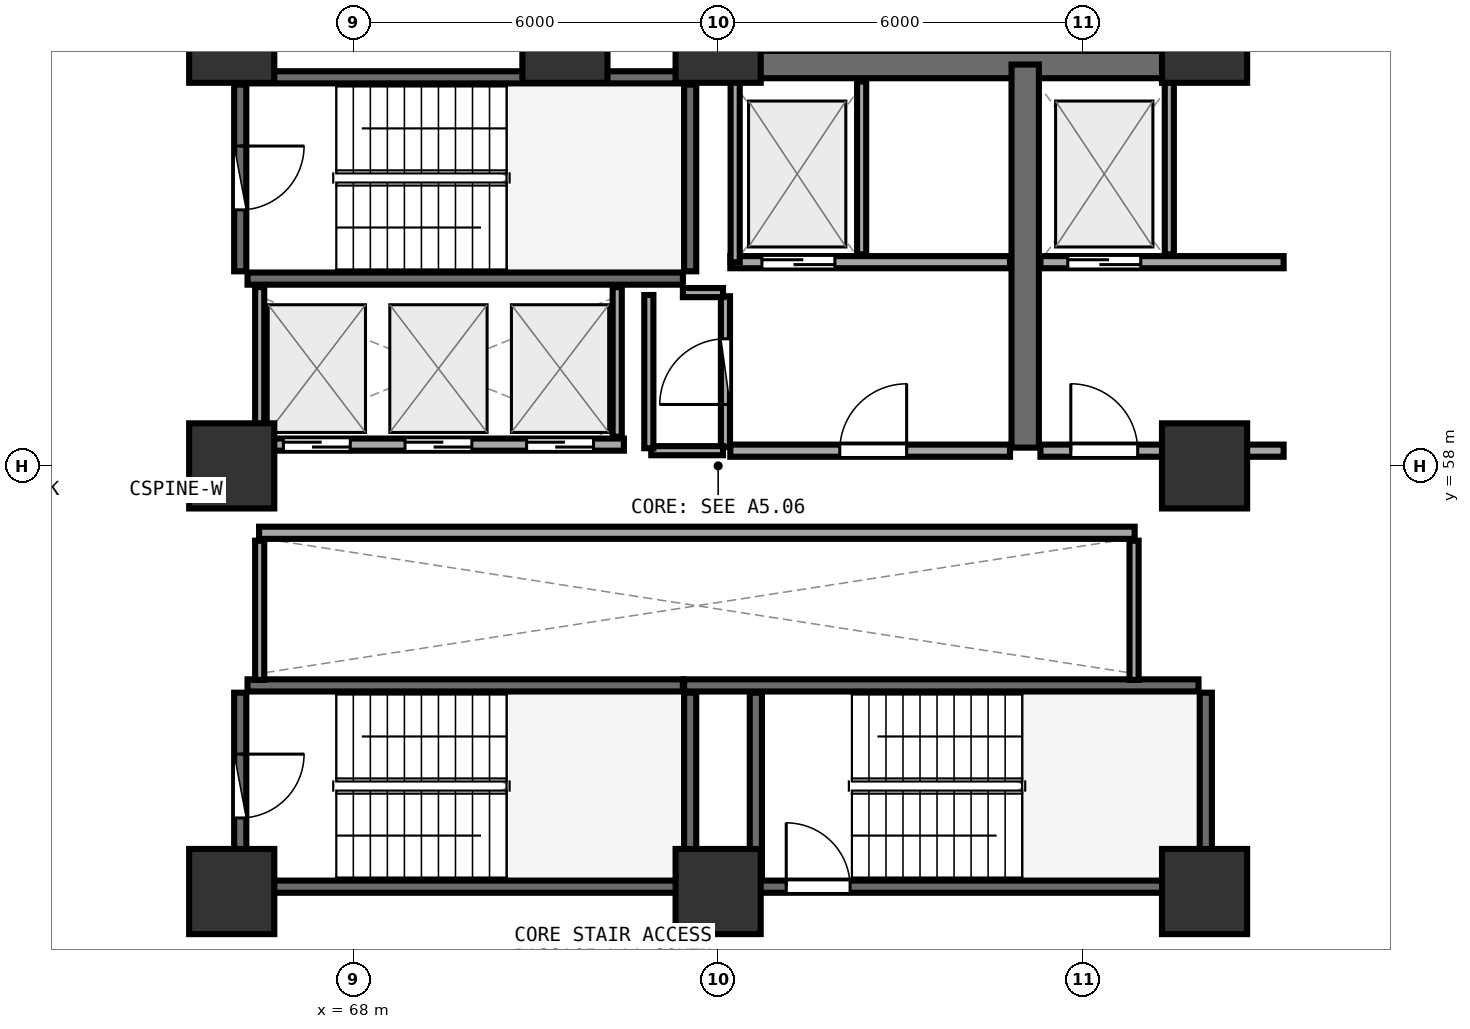
"""IFC4 building model, lengths in metres.
Left out: names, types, materials, properties, quantities, classifications, styles, units other than length and angle.
Written with IfcOpenShell. Run it as: python <this file> out.ifc"""

import sys

from ifc_helpers import new_model, si_unit, direction, frame, frame_2d, origin, origin_2d, place, context, subcontext, project, spatial, rectangle, extrude, element, fill, save


model = new_model("IFC4")
c1 = context("Model", 3, precision=1e-05, world=origin(), true_north=direction((0.0, 1.0)))
c2 = subcontext(c1, "Body", "Model", "MODEL_VIEW")
j1 = project(units=[si_unit("LENGTHUNIT", "METRE"), si_unit("PLANEANGLEUNIT", "RADIAN")], contexts=[c1])
p1 = place(None, origin())
s1 = spatial("IfcSite", under=j1, at=p1, CompositionType="ELEMENT")
p2 = place(p1, origin())
s2 = spatial("IfcBuilding", under=s1, at=p2, CompositionType="ELEMENT")
p3 = place(p2, frame((0.0, 0.0, 45.0)))
s3 = spatial("IfcBuildingStorey", under=s2, at=p3, CompositionType="ELEMENT", Elevation=45.0)
for number, where, z_axis, x_axis in (
    (1, (66.0, 51.0, 0.0), (0.0, 0.0, 1.0), (1.0, 0.0, 0.0)),
    (2, (74.0, 51.0, 0.0), (0.0, 0.0, 1.0), (1.0, 0.0, 0.0)),
    (3, (82.0, 51.0, 0.0), (0.0, 0.0, 1.0), (1.0, 0.0, 0.0)),
    (4, (82.0, 58.0, 0.0), (0.0, 0.0, 1.0), (1.0, 0.0, 0.0)),
    (5, (82.0, 65.0, 0.0), (0.0, 0.0, 1.0), (1.0, 0.0, 0.0)),
    (6, (74.0, 65.0, 0.0), (0.0, 0.0, 1.0), (1.0, 0.0, 0.0)),
    (7, (71.48, 65.0, 0.0), (0.0, 0.0, 1.0), (1.0, 0.0, 0.0)),
    (8, (66.0, 65.0, 0.0), (0.0, 0.0, 1.0), (1.0, 0.0, 0.0)),
    (9, (66.0, 58.0, 0.0), (0.0, 0.0, 1.0), (1.0, 0.0, 0.0)),
):
    element("IfcColumn", number, at=place(p3, frame(where, z_axis=z_axis, x_axis=x_axis)), inside=s3, PredefinedType="PILASTER", context=c2, shape_type="SweptSolid", body=[
        extrude(rectangle(XDim=1.4, YDim=1.4, at=origin_2d()), origin(), (0.0, 0.0, 1.0), 3.75),
    ])
p4 = place(p3, frame((66.26, 61.08, 0.0), z_axis=(0.0, 0.0, 1.0), x_axis=(1.0, 0.0, 0.0)))
e10 = element("IfcWall", 10, at=p4, inside=s3, PredefinedType="SHEAR", context=c2, shape_type="SweptSolid", body=[
    extrude(rectangle(XDim=7.16, YDim=0.2, at=frame_2d((3.58, 0.0))), origin(), (0.0, 0.0, 1.0), 3.49),
])
p5 = place(p3, frame((73.54, 61.2, 0.0), z_axis=(0.0, 0.0, 1.0), x_axis=(0.0, 1.0, 0.0)))
e11 = element("IfcWall", 11, at=p5, inside=s3, PredefinedType="SHEAR", context=c2, shape_type="SweptSolid", body=[
    extrude(rectangle(XDim=3.07, YDim=0.2, at=frame_2d((1.535, 0.0))), origin(), (0.0, 0.0, 1.0), 3.49),
])
p6 = place(p3, frame((73.42, 64.39, 0.0), z_axis=(0.0, 0.0, 1.0), x_axis=(-1.0, 0.0, 0.0)))
e12 = element("IfcWall", 12, at=p6, inside=s3, PredefinedType="SHEAR", context=c2, shape_type="SweptSolid", body=[
    extrude(rectangle(XDim=7.16, YDim=0.2, at=frame_2d((3.58, 0.0))), origin(), (0.0, 0.0, 1.0), 3.49),
])
p7 = place(p3, frame((66.14, 64.27, 0.0), z_axis=(0.0, 0.0, 1.0), x_axis=(0.0, -1.0, 0.0)))
e13 = element("IfcWall", 13, at=p7, inside=s3, PredefinedType="SHEAR", context=c2, shape_type="SweptSolid", body=[
    extrude(rectangle(XDim=3.07, YDim=0.2, at=frame_2d((1.535, 0.0))), origin(), (0.0, 0.0, 1.0), 3.49),
])
p8 = place(p7, frame((1.01, 0.0, 0.0)))
e14 = element("IfcOpeningElement", 14, at=p8, cuts=e13, PredefinedType="OPENING", context=c2, shape_type="SweptSolid", body=[
    extrude(rectangle(XDim=1.05, YDim=2.1, at=frame_2d((0.525, 1.05))), frame((0.0, 0.11, 0.0), z_axis=(0.0, -1.0, 0.0), x_axis=(1.0, 0.0, 0.0)), (0.0, 0.0, 1.0), 0.22),
])
p9 = place(p3, frame((74.0, 51.08, 0.0), z_axis=(0.0, 0.0, 1.0), x_axis=(1.0, 0.0, 0.0)))
e15 = element("IfcWall", 15, at=p9, inside=s3, PredefinedType="SHEAR", context=c2, shape_type="SweptSolid", body=[
    extrude(rectangle(XDim=7.9, YDim=0.2, at=frame_2d((3.95, 0.0))), origin(), (0.0, 0.0, 1.0), 3.49),
])
p10 = place(p9, frame((1.12, 0.0, 0.0)))
e16 = element("IfcOpeningElement", 16, at=p10, cuts=e15, PredefinedType="OPENING", context=c2, shape_type="SweptSolid", body=[
    extrude(rectangle(XDim=1.05, YDim=2.1, at=frame_2d((0.525, 1.05))), frame((0.0, 0.11, 0.0), z_axis=(0.0, -1.0, 0.0), x_axis=(1.0, 0.0, 0.0)), (0.0, 0.0, 1.0), 0.22),
])
p11 = place(p3, frame((82.02, 51.2, 0.0), z_axis=(0.0, 0.0, 1.0), x_axis=(0.0, 1.0, 0.0)))
e17 = element("IfcWall", 17, at=p11, inside=s3, PredefinedType="SHEAR", context=c2, shape_type="SweptSolid", body=[
    extrude(rectangle(XDim=3.07, YDim=0.2, at=frame_2d((1.535, 0.0))), origin(), (0.0, 0.0, 1.0), 3.49),
])
p12 = place(p3, frame((81.9, 54.39, 0.0), z_axis=(0.0, 0.0, 1.0), x_axis=(-1.0, 0.0, 0.0)))
e18 = element("IfcWall", 18, at=p12, inside=s3, PredefinedType="SHEAR", context=c2, shape_type="SweptSolid", body=[
    extrude(rectangle(XDim=8.46, YDim=0.2, at=frame_2d((4.23, 0.0))), origin(), (0.0, 0.0, 1.0), 3.49),
])
p13 = place(p3, frame((74.62, 54.27, 0.0), z_axis=(0.0, 0.0, 1.0), x_axis=(0.0, -1.0, 0.0)))
e19 = element("IfcWall", 19, at=p13, inside=s3, PredefinedType="SHEAR", context=c2, shape_type="SweptSolid", body=[
    extrude(rectangle(XDim=3.07, YDim=0.2, at=frame_2d((1.535, 0.0))), origin(), (0.0, 0.0, 1.0), 3.49),
])
p14 = place(p3, frame((66.26, 51.08, 0.0), z_axis=(0.0, 0.0, 1.0), x_axis=(1.0, 0.0, 0.0)))
e20 = element("IfcWall", 20, at=p14, inside=s3, PredefinedType="SHEAR", context=c2, shape_type="SweptSolid", body=[
    extrude(rectangle(XDim=7.16, YDim=0.2, at=frame_2d((3.58, 0.0))), origin(), (0.0, 0.0, 1.0), 3.49),
])
p15 = place(p3, frame((73.54, 51.2, 0.0), z_axis=(0.0, 0.0, 1.0), x_axis=(0.0, 1.0, 0.0)))
e21 = element("IfcWall", 21, at=p15, inside=s3, PredefinedType="SHEAR", context=c2, shape_type="SweptSolid", body=[
    extrude(rectangle(XDim=3.07, YDim=0.2, at=frame_2d((1.535, 0.0))), origin(), (0.0, 0.0, 1.0), 3.49),
])
p16 = place(p3, frame((73.42, 54.39, 0.0), z_axis=(0.0, 0.0, 1.0), x_axis=(-1.0, 0.0, 0.0)))
e22 = element("IfcWall", 22, at=p16, inside=s3, PredefinedType="SHEAR", context=c2, shape_type="SweptSolid", body=[
    extrude(rectangle(XDim=7.16, YDim=0.2, at=frame_2d((3.58, 0.0))), origin(), (0.0, 0.0, 1.0), 3.49),
])
p17 = place(p3, frame((66.14, 54.27, 0.0), z_axis=(0.0, 0.0, 1.0), x_axis=(0.0, -1.0, 0.0)))
e23 = element("IfcWall", 23, at=p17, inside=s3, PredefinedType="SHEAR", context=c2, shape_type="SweptSolid", body=[
    extrude(rectangle(XDim=3.07, YDim=0.2, at=frame_2d((1.535, 0.0))), origin(), (0.0, 0.0, 1.0), 3.49),
])
p18 = place(p17, frame((1.01, 0.0, 0.0)))
e24 = element("IfcOpeningElement", 24, at=p18, cuts=e23, PredefinedType="OPENING", context=c2, shape_type="SweptSolid", body=[
    extrude(rectangle(XDim=1.05, YDim=2.1, at=frame_2d((0.525, 1.05))), frame((0.0, 0.11, 0.0), z_axis=(0.0, -1.0, 0.0), x_axis=(1.0, 0.0, 0.0)), (0.0, 0.0, 1.0), 0.22),
])
p19 = place(p3, frame((74.0, 64.6, 0.0), z_axis=(0.0, 0.0, 1.0), x_axis=(1.0, 0.0, 0.0)))
e25 = element("IfcWall", 25, at=p19, inside=s3, PredefinedType="SHEAR", context=c2, shape_type="SweptSolid", body=[
    extrude(rectangle(XDim=8.0, YDim=0.45, at=frame_2d((4.0, 0.0))), origin(), (0.0, 0.0, 1.0), 3.49),
])
p20 = place(p3, frame((79.05, 58.3, 0.0), z_axis=(0.0, 0.0, 1.0), x_axis=(0.0, 1.0, 0.0)))
e26 = element("IfcWall", 26, at=p20, inside=s3, PredefinedType="SHEAR", context=c2, shape_type="SweptSolid", body=[
    extrude(rectangle(XDim=6.3, YDim=0.45, at=frame_2d((3.15, 0.0))), origin(), (0.0, 0.0, 1.0), 3.49),
])
p21 = place(p3, frame((74.2, 61.35, 0.0), z_axis=(0.0, 0.0, 1.0), x_axis=(1.0, 0.0, 0.0)))
e27 = element("IfcWall", 27, at=p21, inside=s3, PredefinedType="SOLIDWALL", context=c2, shape_type="SweptSolid", body=[
    extrude(rectangle(XDim=4.6, YDim=0.2, at=frame_2d((2.3, 0.0))), origin(), (0.0, 0.0, 1.0), 3.48),
])
p22 = place(p21, frame((0.52, 0.0, 0.0)))
e28 = element("IfcOpeningElement", 28, at=p22, cuts=e27, PredefinedType="OPENING", context=c2, shape_type="SweptSolid", body=[
    extrude(rectangle(XDim=1.2, YDim=2.15, at=frame_2d((0.6, 1.075))), frame((0.0, 0.11, 0.0), z_axis=(0.0, -1.0, 0.0), x_axis=(1.0, 0.0, 0.0)), (0.0, 0.0, 1.0), 0.22),
])
p23 = place(p3, frame((74.28, 61.35, 0.0), z_axis=(0.0, 0.0, 1.0), x_axis=(0.0, 1.0, 0.0)))
e29 = element("IfcWall", 29, at=p23, inside=s3, PredefinedType="PARTITIONING", context=c2, shape_type="SweptSolid", body=[
    extrude(rectangle(XDim=2.97, YDim=0.15, at=frame_2d((1.485, 0.0))), origin(), (0.0, 0.0, 1.0), 3.48),
])
p24 = place(p3, frame((76.36, 61.48, 0.0), z_axis=(0.0, 0.0, 1.0), x_axis=(0.0, 1.0, 0.0)))
e30 = element("IfcWall", 30, at=p24, inside=s3, PredefinedType="PARTITIONING", context=c2, shape_type="SweptSolid", body=[
    extrude(rectangle(XDim=2.84, YDim=0.15, at=frame_2d((1.42, 0.0))), origin(), (0.0, 0.0, 1.0), 3.48),
])
p25 = place(p3, frame((79.3, 61.35, 0.0), z_axis=(0.0, 0.0, 1.0), x_axis=(1.0, 0.0, 0.0)))
e31 = element("IfcWall", 31, at=p25, inside=s3, PredefinedType="SOLIDWALL", context=c2, shape_type="SweptSolid", body=[
    extrude(rectangle(XDim=4.0, YDim=0.2, at=frame_2d((2.0, 0.0))), origin(), (0.0, 0.0, 1.0), 2.775),
])
p26 = place(p25, frame((0.45, 0.0, 0.0)))
e32 = element("IfcOpeningElement", 32, at=p26, cuts=e31, PredefinedType="OPENING", context=c2, shape_type="SweptSolid", body=[
    extrude(rectangle(XDim=1.2, YDim=2.15, at=frame_2d((0.6, 1.075))), frame((0.0, 0.11, 0.0), z_axis=(0.0, -1.0, 0.0), x_axis=(1.0, 0.0, 0.0)), (0.0, 0.0, 1.0), 0.22),
])
p27 = place(p3, frame((81.42, 61.48, 0.0), z_axis=(0.0, 0.0, 1.0), x_axis=(0.0, 1.0, 0.0)))
e33 = element("IfcWall", 33, at=p27, inside=s3, PredefinedType="PARTITIONING", context=c2, shape_type="SweptSolid", body=[
    extrude(rectangle(XDim=2.84, YDim=0.15, at=frame_2d((1.42, 0.0))), origin(), (0.0, 0.0, 1.0), 3.48),
])
p28 = place(p3, frame((74.2, 58.25, 0.0), z_axis=(0.0, 0.0, 1.0), x_axis=(1.0, 0.0, 0.0)))
e34 = element("IfcWall", 34, at=p28, inside=s3, PredefinedType="SOLIDWALL", context=c2, shape_type="SweptSolid", body=[
    extrude(rectangle(XDim=4.6, YDim=0.2, at=frame_2d((2.3, 0.0))), origin(), (0.0, 0.0, 1.0), 3.48),
])
p29 = place(p28, frame((1.8, 0.0, 0.0)))
e35 = element("IfcOpeningElement", 35, at=p29, cuts=e34, PredefinedType="OPENING", context=c2, shape_type="SweptSolid", body=[
    extrude(rectangle(XDim=1.1, YDim=2.1, at=frame_2d((0.55, 1.05))), frame((0.0, 0.11, 0.0), z_axis=(0.0, -1.0, 0.0), x_axis=(1.0, 0.0, 0.0)), (0.0, 0.0, 1.0), 0.22),
])
p30 = place(p3, frame((79.3, 58.25, 0.0), z_axis=(0.0, 0.0, 1.0), x_axis=(1.0, 0.0, 0.0)))
e36 = element("IfcWall", 36, at=p30, inside=s3, PredefinedType="SOLIDWALL", context=c2, shape_type="SweptSolid", body=[
    extrude(rectangle(XDim=4.0, YDim=0.2, at=frame_2d((2.0, 0.0))), origin(), (0.0, 0.0, 1.0), 2.775),
])
p31 = place(p30, frame((0.5, 0.0, 0.0)))
e37 = element("IfcOpeningElement", 37, at=p31, cuts=e36, PredefinedType="OPENING", context=c2, shape_type="SweptSolid", body=[
    extrude(rectangle(XDim=1.1, YDim=2.1, at=frame_2d((0.55, 1.05))), frame((0.0, 0.11, 0.0), z_axis=(0.0, -1.0, 0.0), x_axis=(1.0, 0.0, 0.0)), (0.0, 0.0, 1.0), 0.22),
])
p32 = place(p3, frame((66.45, 58.35, 0.0), z_axis=(0.0, 0.0, 1.0), x_axis=(1.0, 0.0, 0.0)))
e38 = element("IfcWall", 38, at=p32, inside=s3, PredefinedType="SOLIDWALL", context=c2, shape_type="SweptSolid", body=[
    extrude(rectangle(XDim=6.0, YDim=0.2, at=frame_2d((3.0, 0.0))), origin(), (0.0, 0.0, 1.0), 3.48),
])
p33 = place(p32, frame((0.4, 0.0, 0.0)))
e39 = element("IfcOpeningElement", 39, at=p33, cuts=e38, PredefinedType="OPENING", context=c2, shape_type="SweptSolid", body=[
    extrude(rectangle(XDim=1.1, YDim=2.1, at=frame_2d((0.55, 1.05))), frame((0.0, 0.11, 0.0), z_axis=(0.0, -1.0, 0.0), x_axis=(1.0, 0.0, 0.0)), (0.0, 0.0, 1.0), 0.22),
])
p34 = place(p32, frame((2.4, 0.0, 0.0)))
e40 = element("IfcOpeningElement", 40, at=p34, cuts=e38, PredefinedType="OPENING", context=c2, shape_type="SweptSolid", body=[
    extrude(rectangle(XDim=1.1, YDim=2.1, at=frame_2d((0.55, 1.05))), frame((0.0, 0.11, 0.0), z_axis=(0.0, -1.0, 0.0), x_axis=(1.0, 0.0, 0.0)), (0.0, 0.0, 1.0), 0.22),
])
p35 = place(p32, frame((4.4, 0.0, 0.0)))
e41 = element("IfcOpeningElement", 41, at=p35, cuts=e38, PredefinedType="OPENING", context=c2, shape_type="SweptSolid", body=[
    extrude(rectangle(XDim=1.1, YDim=2.1, at=frame_2d((0.55, 1.05))), frame((0.0, 0.11, 0.0), z_axis=(0.0, -1.0, 0.0), x_axis=(1.0, 0.0, 0.0)), (0.0, 0.0, 1.0), 0.22),
])
for number, where, z_axis, x_axis in (
    (42, (66.46, 58.48, 0.0), (0.0, 0.0, 1.0), (0.0, 1.0, 0.0)),
    (43, (72.34, 58.48, 0.0), (0.0, 0.0, 1.0), (0.0, 1.0, 0.0)),
):
    element("IfcWall", number, at=place(p3, frame(where, z_axis=z_axis, x_axis=x_axis)), inside=s3, PredefinedType="PARTITIONING", context=c2, shape_type="SweptSolid", body=[
        extrude(rectangle(XDim=2.46, YDim=0.15, at=frame_2d((1.23, 0.0))), origin(), (0.0, 0.0, 1.0), 3.48),
    ])
p36 = place(p3, frame((66.45, 56.9, 0.0), z_axis=(0.0, 0.0, 1.0), x_axis=(1.0, 0.0, 0.0)))
e44 = element("IfcWall", 44, at=p36, inside=s3, PredefinedType="SOLIDWALL", context=c2, shape_type="SweptSolid", body=[
    extrude(rectangle(XDim=14.4, YDim=0.2, at=frame_2d((7.2, 0.0))), origin(), (0.0, 0.0, 1.0), 3.48),
])
for number, where, z_axis, x_axis in (
    (45, (66.46, 54.48, 0.0), (0.0, 0.0, 1.0), (0.0, 1.0, 0.0)),
    (46, (80.84, 54.48, 0.0), (0.0, 0.0, 1.0), (0.0, 1.0, 0.0)),
):
    element("IfcWall", number, at=place(p3, frame(where, z_axis=z_axis, x_axis=x_axis)), inside=s3, PredefinedType="PARTITIONING", context=c2, shape_type="SweptSolid", body=[
        extrude(rectangle(XDim=2.29, YDim=0.15, at=frame_2d((1.145, 0.0))), origin(), (0.0, 0.0, 1.0), 3.48),
    ])
p37 = place(p3, frame((74.12, 58.31, 0.0), z_axis=(0.0, 0.0, 1.0), x_axis=(0.0, 1.0, 0.0)))
e47 = element("IfcWall", 47, at=p37, inside=s3, PredefinedType="PARTITIONING", context=c2, shape_type="SweptSolid", body=[
    extrude(rectangle(XDim=2.48, YDim=0.15, at=frame_2d((1.24, 0.0))), origin(), (0.0, 0.0, 1.0), 3.48),
])
p38 = place(p37, frame((0.7, 0.0, 0.0)))
e48 = element("IfcOpeningElement", 48, at=p38, cuts=e47, PredefinedType="OPENING", context=c2, shape_type="SweptSolid", body=[
    extrude(rectangle(XDim=1.08, YDim=2.1, at=frame_2d((0.54, 1.05))), frame((0.0, 0.085, 0.0), z_axis=(0.0, -1.0, 0.0), x_axis=(1.0, 0.0, 0.0)), (0.0, 0.0, 1.0), 0.17),
])
p39 = place(p3, frame((61.499, 50.454, 0.0), z_axis=(0.0, 0.0, 1.0), x_axis=(0.747393415848, -0.664381729089, 0.0)))
e49 = element("IfcWall", 49, at=p39, inside=s3, PredefinedType="PARTITIONING", context=c2, shape_type="SweptSolid", body=[
    extrude(rectangle(XDim=5.929, YDim=0.12, at=frame_2d((2.965, 0.0))), origin(), (0.0, 0.0, 1.0), 2.875),
])
p40 = place(p39, frame((2.515, 0.0, 0.0)))
e50 = element("IfcOpeningElement", 50, at=p40, cuts=e49, PredefinedType="OPENING", context=c2, shape_type="SweptSolid", body=[
    extrude(rectangle(XDim=0.9, YDim=2.08, at=frame_2d((0.45, 1.04))), frame((0.0, 0.07, 0.0), z_axis=(0.0, -1.0, 0.0), x_axis=(1.0, 0.0, 0.0)), (0.0, 0.0, 1.0), 0.14),
])
p41 = place(p3, frame((84.895, 48.628, 0.0), z_axis=(0.0, 0.0, 1.0), x_axis=(0.560933949984, 0.827860558159, 0.0)))
e51 = element("IfcWall", 51, at=p41, inside=s3, PredefinedType="PARTITIONING", context=c2, shape_type="SweptSolid", body=[
    extrude(rectangle(XDim=5.788, YDim=0.12, at=frame_2d((2.894, 0.0))), origin(), (0.0, 0.0, 1.0), 2.875),
])
p42 = place(p41, frame((2.444, 0.0, 0.0)))
e52 = element("IfcOpeningElement", 52, at=p42, cuts=e51, PredefinedType="OPENING", context=c2, shape_type="SweptSolid", body=[
    extrude(rectangle(XDim=0.9, YDim=2.08, at=frame_2d((0.45, 1.04))), frame((0.0, 0.07, 0.0), z_axis=(0.0, -1.0, 0.0), x_axis=(1.0, 0.0, 0.0)), (0.0, 0.0, 1.0), 0.14),
])
p43 = place(p3, frame((72.9, 58.25, 0.0), z_axis=(0.0, 0.0, 1.0), x_axis=(1.0, 0.0, 0.0)))
e53 = element("IfcWall", 53, at=p43, inside=s3, PredefinedType="PARTITIONING", context=c2, shape_type="SweptSolid", body=[
    extrude(rectangle(XDim=1.18, YDim=0.15, at=frame_2d((0.59, 0.0))), origin(), (0.0, 0.0, 1.0), 3.48),
])
p44 = place(p3, frame((74.08, 60.85, 0.0), z_axis=(0.0, 0.0, 1.0), x_axis=(-1.0, 0.0, 0.0)))
e54 = element("IfcWall", 54, at=p44, inside=s3, PredefinedType="PARTITIONING", context=c2, shape_type="SweptSolid", body=[
    extrude(rectangle(XDim=0.66, YDim=0.15, at=frame_2d((0.33, 0.0))), origin(), (0.0, 0.0, 1.0), 3.48),
])
p45 = place(p3, frame((72.86, 60.81, 0.0), z_axis=(0.0, 0.0, 1.0), x_axis=(0.0, -1.0, 0.0)))
e55 = element("IfcWall", 55, at=p45, inside=s3, PredefinedType="PARTITIONING", context=c2, shape_type="SweptSolid", body=[
    extrude(rectangle(XDim=2.52, YDim=0.15, at=frame_2d((1.26, 0.0))), origin(), (0.0, 0.0, 1.0), 3.48),
])
p46 = place(p8, origin())
e56 = element("IfcDoor", 56, at=p46, inside=s3, OperationType="SINGLE_SWING_LEFT", PredefinedType="DOOR", context=c2, shape_type="SweptSolid", body=[
    extrude(rectangle(XDim=1.05, YDim=2.1, at=frame_2d((0.525, 1.05))), frame((0.0, 0.025, 0.0), z_axis=(0.0, -1.0, 0.0), x_axis=(1.0, 0.0, 0.0)), (0.0, 0.0, 1.0), 0.05),
])
fill(e14, e56)
p47 = place(p10, origin())
e57 = element("IfcDoor", 57, at=p47, inside=s3, OperationType="SINGLE_SWING_LEFT", PredefinedType="DOOR", context=c2, shape_type="SweptSolid", body=[
    extrude(rectangle(XDim=1.05, YDim=2.1, at=frame_2d((0.525, 1.05))), frame((0.0, 0.025, 0.0), z_axis=(0.0, -1.0, 0.0), x_axis=(1.0, 0.0, 0.0)), (0.0, 0.0, 1.0), 0.05),
])
fill(e16, e57)
p48 = place(p18, origin())
e58 = element("IfcDoor", 58, at=p48, inside=s3, OperationType="SINGLE_SWING_LEFT", PredefinedType="DOOR", context=c2, shape_type="SweptSolid", body=[
    extrude(rectangle(XDim=1.05, YDim=2.1, at=frame_2d((0.525, 1.05))), frame((0.0, 0.025, 0.0), z_axis=(0.0, -1.0, 0.0), x_axis=(1.0, 0.0, 0.0)), (0.0, 0.0, 1.0), 0.05),
])
fill(e24, e58)
p49 = place(p22, origin())
e59 = element("IfcDoor", 59, at=p49, inside=s3, OperationType="DOUBLE_DOOR_SLIDING", PredefinedType="DOOR", context=c2, shape_type="SweptSolid", body=[
    extrude(rectangle(XDim=1.2, YDim=2.15, at=frame_2d((0.6, 1.075))), frame((0.0, 0.025, 0.0), z_axis=(0.0, -1.0, 0.0), x_axis=(1.0, 0.0, 0.0)), (0.0, 0.0, 1.0), 0.05),
])
fill(e28, e59)
p50 = place(p26, origin())
e60 = element("IfcDoor", 60, at=p50, inside=s3, OperationType="DOUBLE_DOOR_SLIDING", PredefinedType="DOOR", context=c2, shape_type="SweptSolid", body=[
    extrude(rectangle(XDim=1.2, YDim=2.15, at=frame_2d((0.6, 1.075))), frame((0.0, 0.025, 0.0), z_axis=(0.0, -1.0, 0.0), x_axis=(1.0, 0.0, 0.0)), (0.0, 0.0, 1.0), 0.05),
])
fill(e32, e60)
p51 = place(p29, frame((1.1, 0.0, 0.0), z_axis=(0.0, 0.0, 1.0), x_axis=(-1.0, 0.0, 0.0)))
e61 = element("IfcDoor", 61, at=p51, inside=s3, OperationType="SINGLE_SWING_LEFT", PredefinedType="DOOR", context=c2, shape_type="SweptSolid", body=[
    extrude(rectangle(XDim=1.1, YDim=2.1, at=frame_2d((0.55, 1.05))), frame((0.0, 0.025, 0.0), z_axis=(0.0, -1.0, 0.0), x_axis=(1.0, 0.0, 0.0)), (0.0, 0.0, 1.0), 0.05),
])
fill(e35, e61)
p52 = place(p31, frame((1.1, 0.0, 0.0), z_axis=(0.0, 0.0, 1.0), x_axis=(-1.0, 0.0, 0.0)))
e62 = element("IfcDoor", 62, at=p52, inside=s3, OperationType="SINGLE_SWING_RIGHT", PredefinedType="DOOR", context=c2, shape_type="SweptSolid", body=[
    extrude(rectangle(XDim=1.1, YDim=2.1, at=frame_2d((0.55, 1.05))), frame((0.0, 0.025, 0.0), z_axis=(0.0, -1.0, 0.0), x_axis=(1.0, 0.0, 0.0)), (0.0, 0.0, 1.0), 0.05),
])
fill(e37, e62)
p53 = place(p33, origin())
e63 = element("IfcDoor", 63, at=p53, inside=s3, OperationType="DOUBLE_DOOR_SLIDING", PredefinedType="DOOR", context=c2, shape_type="SweptSolid", body=[
    extrude(rectangle(XDim=1.1, YDim=2.1, at=frame_2d((0.55, 1.05))), frame((0.0, 0.025, 0.0), z_axis=(0.0, -1.0, 0.0), x_axis=(1.0, 0.0, 0.0)), (0.0, 0.0, 1.0), 0.05),
])
fill(e39, e63)
p54 = place(p34, origin())
e64 = element("IfcDoor", 64, at=p54, inside=s3, OperationType="DOUBLE_DOOR_SLIDING", PredefinedType="DOOR", context=c2, shape_type="SweptSolid", body=[
    extrude(rectangle(XDim=1.1, YDim=2.1, at=frame_2d((0.55, 1.05))), frame((0.0, 0.025, 0.0), z_axis=(0.0, -1.0, 0.0), x_axis=(1.0, 0.0, 0.0)), (0.0, 0.0, 1.0), 0.05),
])
fill(e40, e64)
p55 = place(p35, origin())
e65 = element("IfcDoor", 65, at=p55, inside=s3, OperationType="DOUBLE_DOOR_SLIDING", PredefinedType="DOOR", context=c2, shape_type="SweptSolid", body=[
    extrude(rectangle(XDim=1.1, YDim=2.1, at=frame_2d((0.55, 1.05))), frame((0.0, 0.025, 0.0), z_axis=(0.0, -1.0, 0.0), x_axis=(1.0, 0.0, 0.0)), (0.0, 0.0, 1.0), 0.05),
])
fill(e41, e65)
p56 = place(p38, origin())
e66 = element("IfcDoor", 66, at=p56, inside=s3, OperationType="SINGLE_SWING_LEFT", PredefinedType="DOOR", context=c2, shape_type="SweptSolid", body=[
    extrude(rectangle(XDim=1.08, YDim=2.1, at=frame_2d((0.54, 1.05))), frame((0.0, 0.025, 0.0), z_axis=(0.0, -1.0, 0.0), x_axis=(1.0, 0.0, 0.0)), (0.0, 0.0, 1.0), 0.05),
])
fill(e48, e66)
save(model, sys.argv[1])
